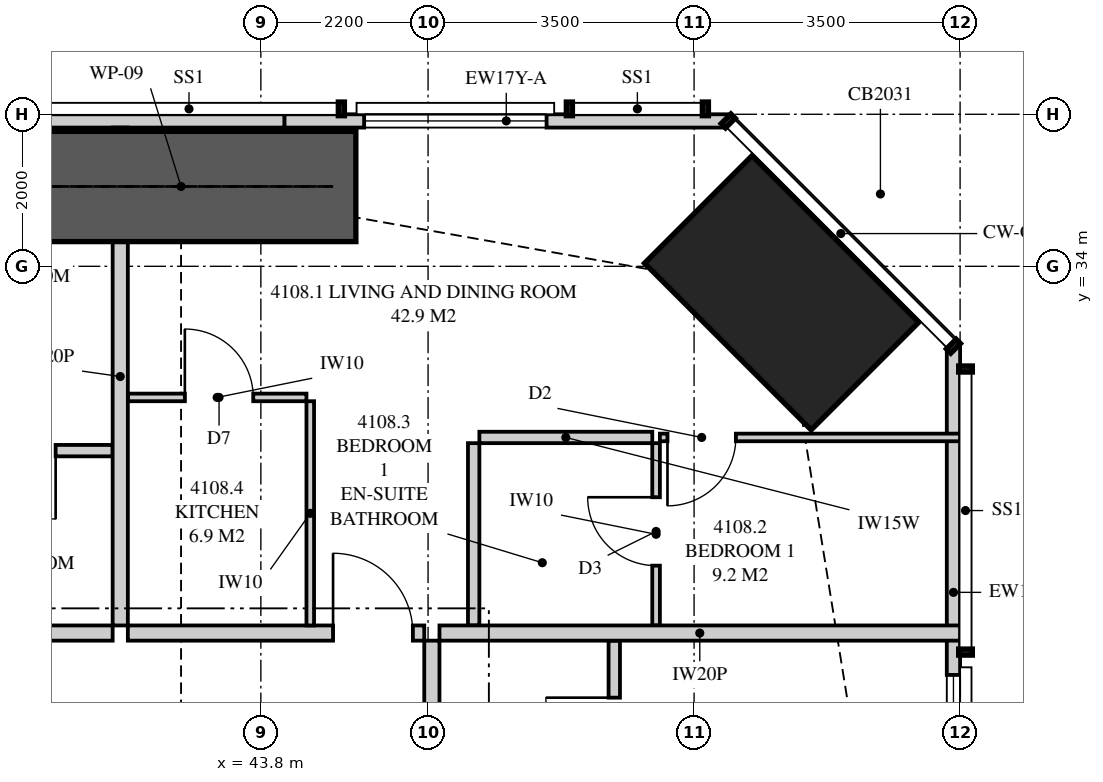
"""IFC4 building model, lengths in metres.
Left out: names, types, materials, properties, quantities, classifications, styles, units other than length and angle.
Written with IfcOpenShell. Run it as: python <this file> out.ifc"""

import sys

from ifc_helpers import new_model, si_unit, direction, frame, frame_2d, origin, origin_2d, place, context, subcontext, project, spatial, polyline, rectangle, hollow_rectangle, outline, extrude, element, fill, save


model = new_model("IFC4")
c1 = context("Model", 3, precision=1e-05, world=origin(), true_north=direction((0.0, 1.0)))
c2 = subcontext(c1, "Body", "Model", "MODEL_VIEW")
j1 = project(units=[si_unit("LENGTHUNIT", "METRE"), si_unit("PLANEANGLEUNIT", "RADIAN")], contexts=[c1])
p1 = place(None, origin())
s1 = spatial("IfcSite", under=j1, at=p1, CompositionType="ELEMENT")
p2 = place(p1, origin())
s2 = spatial("IfcBuilding", under=s1, at=p2, CompositionType="ELEMENT")
p3 = place(p2, frame((0.0, 0.0, 154.35)))
s3 = spatial("IfcBuildingStorey", under=s2, at=p3, CompositionType="ELEMENT", Elevation=154.35)
p4 = place(p3, frame((50.652, 33.652, 0.0), z_axis=(0.0, 0.0, 1.0), x_axis=(-0.707106781187, -0.707106781187, 0.0)))
e1 = element("IfcColumn", 1, at=p4, inside=s3, PredefinedType="COLUMN", context=c2, shape_type="SweptSolid", body=[
    extrude(hollow_rectangle(XDim=2.0, YDim=3.1, WallThickness=0.125, at=origin_2d()), origin(), (0.0, 0.0, 1.0), 3.35),
])
p5 = place(p3, frame((52.913, 26.472, 0.0), z_axis=(0.0, 0.0, 1.0), x_axis=(0.0, 1.0, 0.0)))
e2 = element("IfcWall", 2, at=p5, inside=s3, PredefinedType="SOLIDWALL", context=c2, shape_type="SweptSolid", body=[
    extrude(rectangle(XDim=6.477, YDim=0.175, at=frame_2d((3.238, 0.0))), origin(), (0.0, 0.0, 1.0), 3.11),
])
p6 = place(p5, frame((0.952, 0.0, 0.4)))
e3 = element("IfcOpeningElement", 3, at=p6, cuts=e2, PredefinedType="OPENING", context=c2, shape_type="SweptSolid", body=[
    extrude(rectangle(XDim=1.2, YDim=1.7, at=frame_2d((0.6, 0.85))), frame((0.0, 0.097, 0.0), z_axis=(0.0, -1.0, 0.0), x_axis=(1.0, 0.0, 0.0)), (0.0, 0.0, 1.0), 0.195),
])
p7 = place(p3, frame((49.949, 35.913, 0.0), z_axis=(0.0, 0.0, 1.0), x_axis=(-1.0, 0.0, 0.0)))
e4 = element("IfcWall", 4, at=p7, inside=s3, PredefinedType="SOLIDWALL", context=c2, shape_type="SweptSolid", body=[
    extrude(rectangle(XDim=5.84, YDim=0.175, at=frame_2d((2.92, 0.0))), origin(), (0.0, 0.0, 1.0), 3.11),
])
p8 = place(p7, frame((2.389, 0.0, 0.4)))
e5 = element("IfcOpeningElement", 5, at=p8, cuts=e4, PredefinedType="OPENING", context=c2, shape_type="SweptSolid", body=[
    extrude(rectangle(XDim=2.4, YDim=1.7, at=frame_2d((1.2, 0.85))), frame((0.0, 0.097, 0.0), z_axis=(0.0, -1.0, 0.0), x_axis=(1.0, 0.0, 0.0)), (0.0, 0.0, 1.0), 0.195),
])
p9 = place(p3, frame((44.109, 35.913, 0.0), z_axis=(0.0, 0.0, 1.0), x_axis=(-1.0, 0.0, 0.0)))
e6 = element("IfcWall", 6, at=p9, inside=s3, PredefinedType="SOLIDWALL", context=c2, shape_type="SweptSolid", body=[
    extrude(outline(polyline([(23.218, 2.15), (0.0, 2.15), (0.0, 0.0), (1.343, 0.0), (1.343, 0.158), (1.624, 0.302), (1.697, 0.302), (1.85, 0.0), (11.636, 0.0), (11.636, 0.178), (11.908, 0.331), (11.964, 0.331), (12.149, 0.0), (21.925, 0.0), (21.925, 0.201), (22.181, 0.358), (22.224, 0.358), (22.444, 0.0), (23.218, 0.0), (23.218, 2.15)])), frame((0.0, 0.087, 0.0), z_axis=(0.0, -1.0, 0.0), x_axis=(1.0, 0.0, 0.0)), (0.0, 0.0, 1.0), 0.175),
])
p10 = place(p9, frame((4.459, 0.0, 0.0)))
e7 = element("IfcOpeningElement", 7, at=p10, cuts=e6, PredefinedType="OPENING", context=c2, shape_type="SweptSolid", body=[
    extrude(rectangle(XDim=1.8, YDim=2.1, at=frame_2d((0.9, 1.05))), frame((0.0, 0.097, 0.0), z_axis=(0.0, -1.0, 0.0), x_axis=(1.0, 0.0, 0.0)), (0.0, 0.0, 1.0), 0.195),
])
p11 = place(p9, frame((6.809, 0.0, 0.4)))
e8 = element("IfcOpeningElement", 8, at=p11, cuts=e6, PredefinedType="OPENING", context=c2, shape_type="SweptSolid", body=[
    extrude(rectangle(XDim=2.4, YDim=1.7, at=frame_2d((1.2, 0.85))), frame((0.0, 0.097, 0.0), z_axis=(0.0, -1.0, 0.0), x_axis=(1.0, 0.0, 0.0)), (0.0, 0.0, 1.0), 0.195),
])
p12 = place(p9, frame((16.859, 0.0, 0.0)))
e9 = element("IfcOpeningElement", 9, at=p12, cuts=e6, PredefinedType="OPENING", context=c2, shape_type="SweptSolid", body=[
    extrude(rectangle(XDim=1.8, YDim=2.1, at=frame_2d((0.9, 1.05))), frame((0.0, 0.097, 0.0), z_axis=(0.0, -1.0, 0.0), x_axis=(1.0, 0.0, 0.0)), (0.0, 0.0, 1.0), 0.195),
])
p13 = place(p9, frame((14.009, 0.0, 0.4)))
e10 = element("IfcOpeningElement", 10, at=p13, cuts=e6, PredefinedType="OPENING", context=c2, shape_type="SweptSolid", body=[
    extrude(rectangle(XDim=2.4, YDim=1.7, at=frame_2d((1.2, 0.85))), frame((0.0, 0.097, 0.0), z_axis=(0.0, -1.0, 0.0), x_axis=(1.0, 0.0, 0.0)), (0.0, 0.0, 1.0), 0.195),
])
p14 = place(p3, frame((41.95, 35.825, 0.0), z_axis=(0.0, 0.0, 1.0), x_axis=(0.0, -1.0, 0.0)))
e11 = element("IfcWall", 11, at=p14, inside=s3, PredefinedType="PARTITIONING", context=c2, shape_type="SweptSolid", body=[
    extrude(outline(polyline([(0.529, 2.15), (0.0, 2.15), (0.0, 0.302), (0.529, 0.302), (0.529, 0.782), (1.021, 0.782), (1.021, 0.302), (1.132, 0.302), (1.223, 0.205), (1.223, 0.0), (6.55, 0.0), (6.55, 3.11), (1.885, 3.11), (1.885, 2.15), (1.021, 2.15), (1.021, 1.218), (0.529, 1.218), (0.529, 2.15)])), frame((0.0, 0.1, 0.0), z_axis=(0.0, -1.0, 0.0), x_axis=(1.0, 0.0, 0.0)), (0.0, 0.0, 1.0), 0.2),
])
p15 = place(p3, frame((34.3, 29.175, 0.0), z_axis=(0.0, 0.0, 1.0), x_axis=(1.0, 0.0, 0.0)))
e12 = element("IfcWall", 12, at=p15, inside=s3, PredefinedType="PARTITIONING", context=c2, shape_type="SweptSolid", body=[
    extrude(rectangle(XDim=7.55, YDim=0.2, at=frame_2d((3.775, 0.0))), origin(), (0.0, 0.0, 1.0), 3.11),
])
p16 = place(p15, frame((3.275, 0.0, 0.0)))
e13 = element("IfcOpeningElement", 13, at=p16, cuts=e12, PredefinedType="OPENING", context=c2, shape_type="SweptSolid", body=[
    extrude(rectangle(XDim=1.05, YDim=2.2, at=frame_2d((0.525, 1.1))), frame((0.0, 0.11, 0.0), z_axis=(0.0, -1.0, 0.0), x_axis=(1.0, 0.0, 0.0)), (0.0, 0.0, 1.0), 0.22),
])
p17 = place(p3, frame((39.425, 31.575, 0.0), z_axis=(0.0, 0.0, 1.0), x_axis=(1.0, 0.0, 0.0)))
e14 = element("IfcWall", 14, at=p17, inside=s3, PredefinedType="PLUMBINGWALL", context=c2, shape_type="SweptSolid", body=[
    extrude(rectangle(XDim=2.425, YDim=0.15, at=frame_2d((1.212, 0.0))), origin(), (0.0, 0.0, 1.0), 3.11),
])
p18 = place(p17, frame((0.775, 0.0, 0.0)))
e15 = element("IfcOpeningElement", 15, at=p18, cuts=e14, PredefinedType="OPENING", context=c2, shape_type="SweptSolid", body=[
    extrude(rectangle(XDim=0.9, YDim=2.1, at=frame_2d((0.45, 1.05))), frame((0.0, 0.085, 0.0), z_axis=(0.0, -1.0, 0.0), x_axis=(1.0, 0.0, 0.0)), (0.0, 0.0, 1.0), 0.17),
])
p19 = place(p3, frame((42.05, 29.175, 0.0), z_axis=(0.0, 0.0, 1.0), x_axis=(1.0, 0.0, 0.0)))
e16 = element("IfcWall", 16, at=p19, inside=s3, PredefinedType="PARTITIONING", context=c2, shape_type="SweptSolid", body=[
    extrude(outline(polyline([(0.0, 0.0), (3.9, 0.0), (3.9, 3.11), (1.046, 3.11), (1.046, 2.531), (0.354, 2.531), (0.354, 3.11), (0.0, 3.11), (0.0, 0.0)])), frame((0.0, 0.1, 0.0), z_axis=(0.0, -1.0, 0.0), x_axis=(1.0, 0.0, 0.0)), (0.0, 0.0, 1.0), 0.2),
])
p20 = place(p19, frame((2.7, 0.0, 0.0)))
e17 = element("IfcOpeningElement", 17, at=p20, cuts=e16, PredefinedType="OPENING", context=c2, shape_type="SweptSolid", body=[
    extrude(rectangle(XDim=1.05, YDim=2.2, at=frame_2d((0.525, 1.1))), frame((0.0, 0.11, 0.0), z_axis=(0.0, -1.0, 0.0), x_axis=(1.0, 0.0, 0.0)), (0.0, 0.0, 1.0), 0.22),
])
p21 = place(p3, frame((49.0, 31.673, 0.0), z_axis=(0.0, 0.0, 1.0), x_axis=(0.0, -1.0, 0.0)))
e18 = element("IfcWall", 18, at=p21, inside=s3, PredefinedType="PARTITIONING", context=c2, shape_type="SweptSolid", body=[
    extrude(rectangle(XDim=2.398, YDim=0.1, at=frame_2d((1.199, 0.0))), origin(), (0.0, 0.0, 1.0), 3.11),
])
p22 = place(p21, frame((0.712, 0.0, 0.0)))
e19 = element("IfcOpeningElement", 19, at=p22, cuts=e18, PredefinedType="OPENING", context=c2, shape_type="SweptSolid", body=[
    extrude(rectangle(XDim=0.9, YDim=2.1, at=frame_2d((0.45, 1.05))), frame((0.0, 0.06, 0.0), z_axis=(0.0, -1.0, 0.0), x_axis=(1.0, 0.0, 0.0)), (0.0, 0.0, 1.0), 0.12),
])
p23 = place(p3, frame((49.05, 31.748, 0.0), z_axis=(0.0, 0.0, 1.0), x_axis=(1.0, 0.0, 0.0)))
e20 = element("IfcWall", 20, at=p23, inside=s3, PredefinedType="PARTITIONING", context=c2, shape_type="SweptSolid", body=[
    extrude(outline(polyline([(0.835, 3.11), (0.0, 3.11), (0.0, 0.0), (2.361, 0.0), (2.424, 0.335), (2.821, 0.185), (2.821, 0.0), (3.95, 0.0), (3.95, 3.11), (2.983, 3.11), (2.983, 2.15), (0.835, 2.15), (0.835, 3.11)])), frame((0.0, 0.05, 0.0), z_axis=(0.0, -1.0, 0.0), x_axis=(1.0, 0.0, 0.0)), (0.0, 0.0, 1.0), 0.1),
])
p24 = place(p23, frame((0.1, 0.0, 0.0)))
e21 = element("IfcOpeningElement", 21, at=p24, cuts=e20, PredefinedType="OPENING", context=c2, shape_type="SweptSolid", body=[
    extrude(rectangle(XDim=0.9, YDim=2.1, at=frame_2d((0.45, 1.05))), frame((0.0, 0.06, 0.0), z_axis=(0.0, -1.0, 0.0), x_axis=(1.0, 0.0, 0.0)), (0.0, 0.0, 1.0), 0.12),
])
p25 = place(p3, frame((46.675, 31.748, 0.0), z_axis=(0.0, 0.0, 1.0), x_axis=(1.0, 0.0, 0.0)))
e22 = element("IfcWall", 22, at=p25, inside=s3, PredefinedType="PLUMBINGWALL", context=c2, shape_type="SweptSolid", body=[
    extrude(rectangle(XDim=2.275, YDim=0.15, at=frame_2d((1.137, 0.0))), origin(), (0.0, 0.0, 1.0), 3.11),
])
p26 = place(p3, frame((46.6, 31.673, 0.0), z_axis=(0.0, 0.0, 1.0), x_axis=(0.0, -1.0, 0.0)))
e23 = element("IfcWall", 23, at=p26, inside=s3, PredefinedType="PLUMBINGWALL", context=c2, shape_type="SweptSolid", body=[
    extrude(rectangle(XDim=2.398, YDim=0.15, at=frame_2d((1.199, 0.0))), origin(), (0.0, 0.0, 1.0), 3.11),
])
p27 = place(p3, frame((42.05, 32.275, 0.0), z_axis=(0.0, 0.0, 1.0), x_axis=(1.0, 0.0, 0.0)))
e24 = element("IfcWall", 24, at=p27, inside=s3, PredefinedType="PARTITIONING", context=c2, shape_type="SweptSolid", body=[
    extrude(outline(polyline([(0.0, 0.0), (2.35, 0.0), (2.35, 3.11), (0.996, 3.11), (0.996, 2.531), (0.404, 2.531), (0.404, 3.11), (0.0, 3.11), (0.0, 0.0)])), frame((0.0, 0.05, 0.0), z_axis=(0.0, -1.0, 0.0), x_axis=(1.0, 0.0, 0.0)), (0.0, 0.0, 1.0), 0.1),
])
p28 = place(p27, frame((0.75, 0.0, 0.0)))
e25 = element("IfcOpeningElement", 25, at=p28, cuts=e24, PredefinedType="OPENING", context=c2, shape_type="SweptSolid", body=[
    extrude(rectangle(XDim=0.9, YDim=2.1, at=frame_2d((0.45, 1.05))), frame((0.0, 0.06, 0.0), z_axis=(0.0, -1.0, 0.0), x_axis=(1.0, 0.0, 0.0)), (0.0, 0.0, 1.0), 0.12),
])
p29 = place(p3, frame((44.45, 32.225, 0.0), z_axis=(0.0, 0.0, 1.0), x_axis=(0.0, -1.0, 0.0)))
e26 = element("IfcWall", 26, at=p29, inside=s3, PredefinedType="PARTITIONING", context=c2, shape_type="SweptSolid", body=[
    extrude(rectangle(XDim=2.95, YDim=0.1, at=frame_2d((1.475, 0.0))), origin(), (0.0, 0.0, 1.0), 3.11),
])
p30 = place(p3, frame((46.15, 29.175, 0.0), z_axis=(0.0, 0.0, 1.0), x_axis=(1.0, 0.0, 0.0)))
e27 = element("IfcWall", 27, at=p30, inside=s3, PredefinedType="PARTITIONING", context=c2, shape_type="SweptSolid", body=[
    extrude(outline(polyline([(0.0, 0.0), (6.85, 0.0), (6.85, 3.11), (6.35, 3.11), (6.35, 2.15), (4.101, 2.15), (4.101, 3.11), (0.0, 3.11), (0.0, 0.0)])), frame((0.0, 0.1, 0.0), z_axis=(0.0, -1.0, 0.0), x_axis=(1.0, 0.0, 0.0)), (0.0, 0.0, 1.0), 0.2),
])
p31 = place(p3, frame((46.05, 22.9, 0.0), z_axis=(0.0, 0.0, 1.0), x_axis=(0.0, 1.0, 0.0)))
e28 = element("IfcWall", 28, at=p31, inside=s3, PredefinedType="PARTITIONING", context=c2, shape_type="SweptSolid", body=[
    extrude(outline(polyline([(0.0, 0.0), (6.175, 0.0), (6.175, 3.11), (2.446, 3.11), (2.446, 2.531), (1.754, 2.531), (1.754, 3.11), (0.0, 3.11), (0.0, 0.0)])), frame((0.0, 0.1, 0.0), z_axis=(0.0, -1.0, 0.0), x_axis=(1.0, 0.0, 0.0)), (0.0, 0.0, 1.0), 0.2),
])
p32 = place(p31, frame((2.587, 0.0, 0.0)))
e29 = element("IfcOpeningElement", 29, at=p32, cuts=e28, PredefinedType="OPENING", context=c2, shape_type="SweptSolid", body=[
    extrude(rectangle(XDim=1.05, YDim=2.2, at=frame_2d((0.525, 1.1))), frame((0.0, 0.11, 0.0), z_axis=(0.0, -1.0, 0.0), x_axis=(1.0, 0.0, 0.0)), (0.0, 0.0, 1.0), 0.22),
])
p33 = place(p3, frame((48.45, 26.65, 0.0), z_axis=(0.0, 0.0, 1.0), x_axis=(0.0, 1.0, 0.0)))
e30 = element("IfcWall", 30, at=p33, inside=s3, PredefinedType="PLUMBINGWALL", context=c2, shape_type="SweptSolid", body=[
    extrude(rectangle(XDim=2.425, YDim=0.15, at=frame_2d((1.212, 0.0))), origin(), (0.0, 0.0, 1.0), 3.11),
])
p34 = place(p33, frame((0.775, 0.0, 0.0)))
e31 = element("IfcOpeningElement", 31, at=p34, cuts=e30, PredefinedType="OPENING", context=c2, shape_type="SweptSolid", body=[
    extrude(rectangle(XDim=0.9, YDim=2.1, at=frame_2d((0.45, 1.05))), frame((0.0, 0.085, 0.0), z_axis=(0.0, -1.0, 0.0), x_axis=(1.0, 0.0, 0.0)), (0.0, 0.0, 1.0), 0.17),
])
p35 = place(p3, frame((40.45, 35.05, 0.0), z_axis=(0.0, 0.0, 1.0), x_axis=(1.0, 0.0, 0.0)))
e32 = element("IfcWall", 32, at=p35, inside=s3, PredefinedType="SHEAR", context=c2, shape_type="SweptSolid", body=[
    extrude(rectangle(XDim=4.6, YDim=1.45, at=frame_2d((2.3, 0.0))), origin(), (0.0, 0.0, 1.0), 3.35),
])
p36 = place(p6, origin())
e33 = element("IfcWindow", 33, at=p36, inside=s3, PartitioningType="SINGLE_PANEL", PredefinedType="WINDOW", context=c2, shape_type="SweptSolid", body=[
    extrude(rectangle(XDim=1.2, YDim=1.7, at=frame_2d((0.6, 0.85))), frame((0.0, 0.03, 0.0), z_axis=(0.0, -1.0, 0.0), x_axis=(1.0, 0.0, 0.0)), (0.0, 0.0, 1.0), 0.06),
])
fill(e3, e33)
p37 = place(p8, origin())
e34 = element("IfcWindow", 34, at=p37, inside=s3, PartitioningType="SINGLE_PANEL", PredefinedType="WINDOW", context=c2, shape_type="SweptSolid", body=[
    extrude(rectangle(XDim=2.4, YDim=1.7, at=frame_2d((1.2, 0.85))), frame((0.0, 0.03, 0.0), z_axis=(0.0, -1.0, 0.0), x_axis=(1.0, 0.0, 0.0)), (0.0, 0.0, 1.0), 0.06),
])
fill(e5, e34)
p38 = place(p18, frame((0.9, 0.0, 0.0), z_axis=(0.0, 0.0, 1.0), x_axis=(-1.0, 0.0, 0.0)))
e35 = element("IfcDoor", 35, at=p38, inside=s3, OperationType="SINGLE_SWING_LEFT", PredefinedType="DOOR", context=c2, shape_type="SweptSolid", body=[
    extrude(rectangle(XDim=0.9, YDim=2.1, at=frame_2d((0.45, 1.05))), frame((0.0, 0.025, 0.0), z_axis=(0.0, -1.0, 0.0), x_axis=(1.0, 0.0, 0.0)), (0.0, 0.0, 1.0), 0.05),
])
fill(e15, e35)
p39 = place(p20, origin())
e36 = element("IfcDoor", 36, at=p39, inside=s3, OperationType="SINGLE_SWING_LEFT", PredefinedType="DOOR", context=c2, shape_type="SweptSolid", body=[
    extrude(rectangle(XDim=1.05, YDim=2.2, at=frame_2d((0.525, 1.1))), frame((0.0, 0.025, 0.0), z_axis=(0.0, -1.0, 0.0), x_axis=(1.0, 0.0, 0.0)), (0.0, 0.0, 1.0), 0.05),
])
fill(e17, e36)
p40 = place(p24, frame((0.9, 0.0, 0.0), z_axis=(0.0, 0.0, 1.0), x_axis=(-1.0, 0.0, 0.0)))
e37 = element("IfcDoor", 37, at=p40, inside=s3, OperationType="SINGLE_SWING_RIGHT", PredefinedType="DOOR", context=c2, shape_type="SweptSolid", body=[
    extrude(rectangle(XDim=0.9, YDim=2.1, at=frame_2d((0.45, 1.05))), frame((0.0, 0.025, 0.0), z_axis=(0.0, -1.0, 0.0), x_axis=(1.0, 0.0, 0.0)), (0.0, 0.0, 1.0), 0.05),
])
fill(e21, e37)
p41 = place(p22, frame((0.9, 0.0, 0.0), z_axis=(0.0, 0.0, 1.0), x_axis=(-1.0, 0.0, 0.0)))
e38 = element("IfcDoor", 38, at=p41, inside=s3, OperationType="SINGLE_SWING_RIGHT", PredefinedType="DOOR", context=c2, shape_type="SweptSolid", body=[
    extrude(rectangle(XDim=0.9, YDim=2.1, at=frame_2d((0.45, 1.05))), frame((0.0, 0.025, 0.0), z_axis=(0.0, -1.0, 0.0), x_axis=(1.0, 0.0, 0.0)), (0.0, 0.0, 1.0), 0.05),
])
fill(e19, e38)
p42 = place(p28, origin())
e39 = element("IfcDoor", 39, at=p42, inside=s3, OperationType="SINGLE_SWING_LEFT", PredefinedType="DOOR", context=c2, shape_type="SweptSolid", body=[
    extrude(rectangle(XDim=0.9, YDim=2.1, at=frame_2d((0.45, 1.05))), frame((0.0, 0.025, 0.0), z_axis=(0.0, -1.0, 0.0), x_axis=(1.0, 0.0, 0.0)), (0.0, 0.0, 1.0), 0.05),
])
fill(e25, e39)
p43 = place(p34, origin())
e40 = element("IfcDoor", 40, at=p43, inside=s3, OperationType="SINGLE_SWING_RIGHT", PredefinedType="DOOR", context=c2, shape_type="SweptSolid", body=[
    extrude(rectangle(XDim=0.9, YDim=2.1, at=frame_2d((0.45, 1.05))), frame((0.0, 0.025, 0.0), z_axis=(0.0, -1.0, 0.0), x_axis=(1.0, 0.0, 0.0)), (0.0, 0.0, 1.0), 0.05),
])
fill(e31, e40)
save(model, sys.argv[1])
